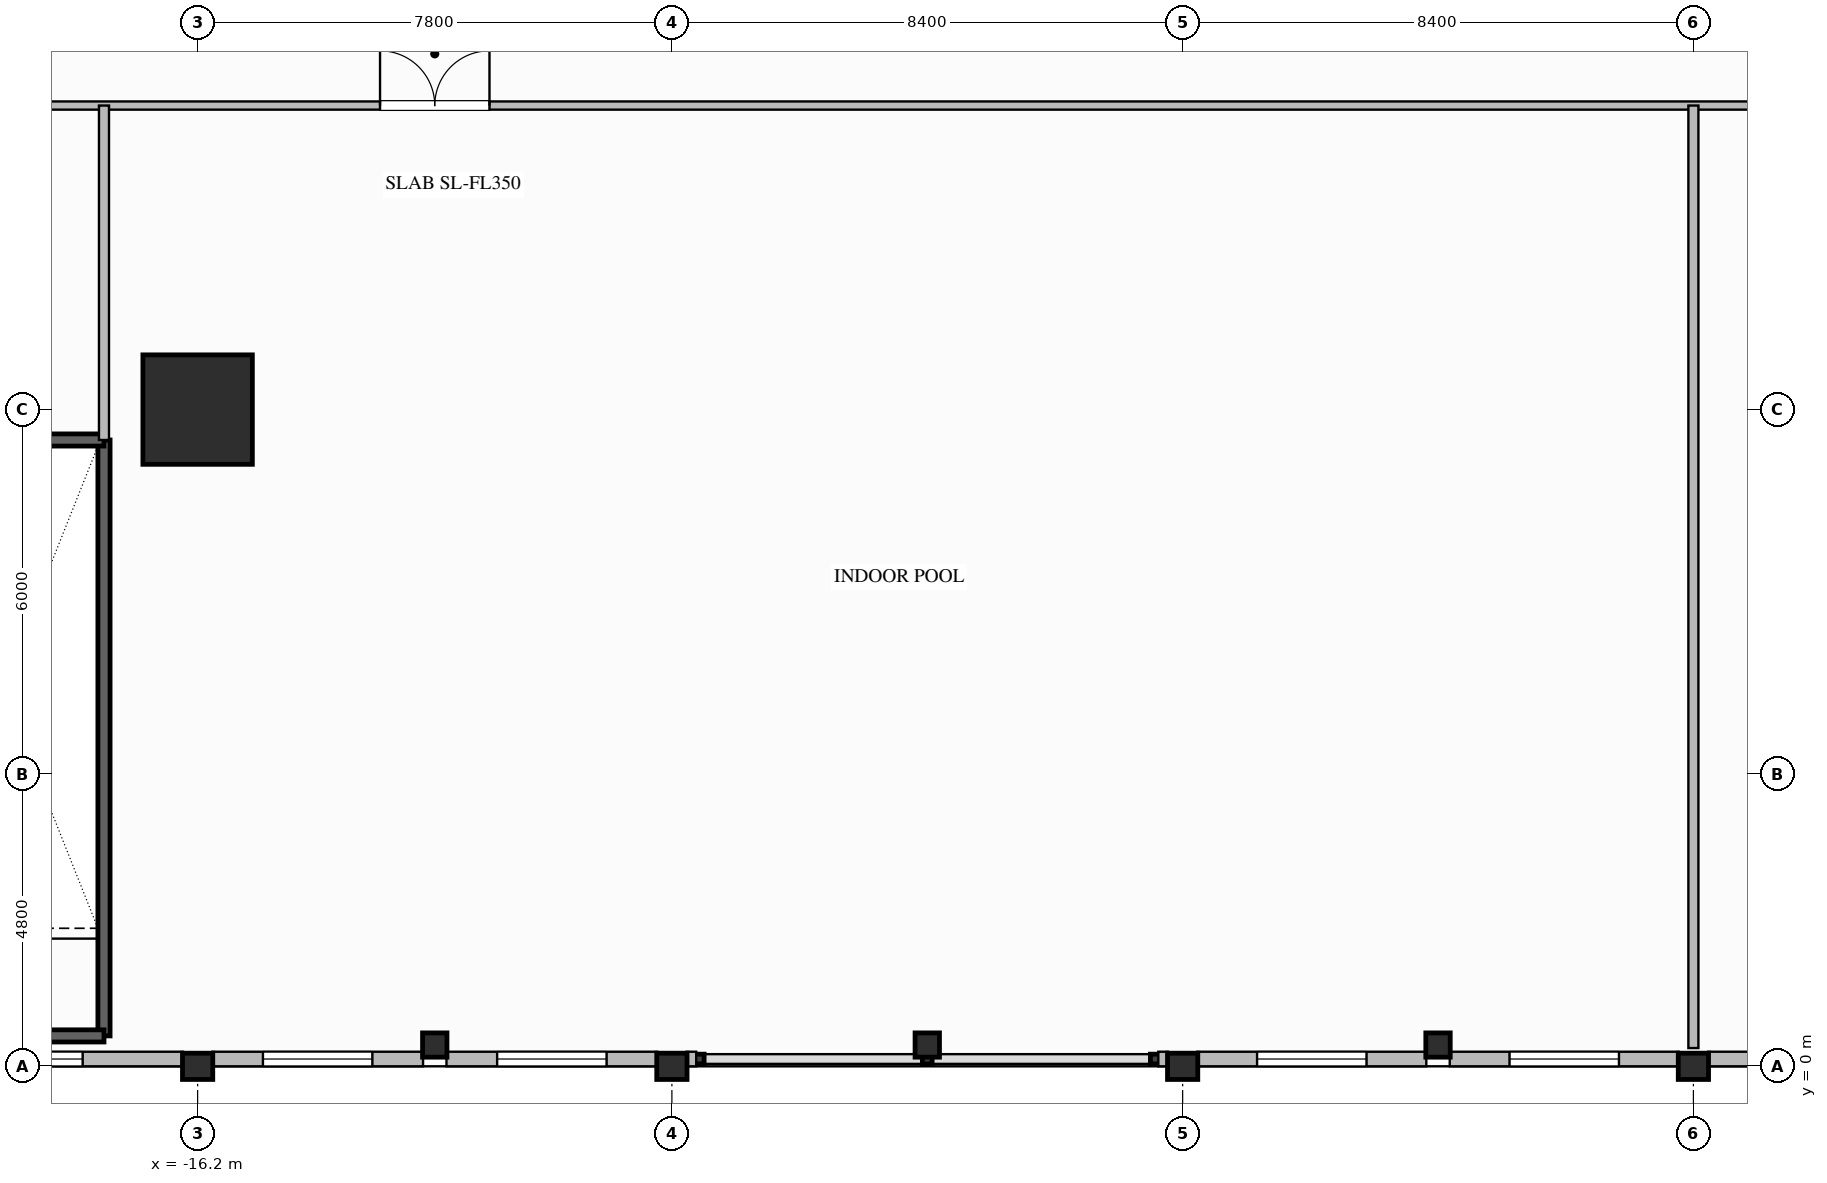
"""IFC4 building model, lengths in metres.
Left out: names, types, materials, properties, quantities, classifications, styles, units other than length and angle.
Written with IfcOpenShell. Run it as: python <this file> out.ifc"""

import sys

from ifc_helpers import new_model, si_unit, direction, frame, frame_2d, origin, origin_2d, place, context, subcontext, project, spatial, rectangle, i_section, extrude, element, fill, save


model = new_model("IFC4")
c1 = context("Model", 3, precision=1e-05, world=origin(), true_north=direction((0.0, 1.0)))
c2 = subcontext(c1, "Body", "Model", "MODEL_VIEW")
j1 = project(units=[si_unit("LENGTHUNIT", "METRE"), si_unit("PLANEANGLEUNIT", "RADIAN")], contexts=[c1])
p1 = place(None, origin())
s1 = spatial("IfcSite", under=j1, at=p1, CompositionType="ELEMENT")
p2 = place(p1, origin())
s2 = spatial("IfcBuilding", under=s1, at=p2, CompositionType="ELEMENT")
p3 = place(p2, frame((0.0, 0.0, 27.6)))
s3 = spatial("IfcBuildingStorey", under=s2, at=p3, CompositionType="ELEMENT", Elevation=27.6)
p4 = place(p3, frame((-16.2, 10.8, 0.0), z_axis=(0.0, 0.0, 1.0), x_axis=(1.0, 0.0, 0.0)))
e1 = element("IfcColumn", 1, at=p4, inside=s3, PredefinedType="COLUMN", context=c2, shape_type="SweptSolid", body=[
    extrude(rectangle(XDim=1.8, YDim=1.8, at=origin_2d()), origin(), (0.0, 0.0, 1.0), 5.6),
])
for number, where, z_axis, x_axis in (
    (2, (-16.2, 0.0, 0.0), (0.0, 0.0, 1.0), (0.0, 1.0, 0.0)),
    (3, (-8.4, 0.0, 0.0), (0.0, 0.0, 1.0), (0.0, 1.0, 0.0)),
    (4, (0.0, 0.0, 0.0), (0.0, 0.0, 1.0), (0.0, 1.0, 0.0)),
    (5, (8.4, 0.0, 0.0), (0.0, 0.0, 1.0), (0.0, 1.0, 0.0)),
):
    element("IfcColumn", number, at=place(p3, frame(where, z_axis=z_axis, x_axis=x_axis)), inside=s3, PredefinedType="COLUMN", context=c2, shape_type="SweptSolid", body=[
        extrude(i_section(OverallWidth=0.432, OverallDepth=0.498, WebThickness=0.056, FlangeThickness=0.089, FilletRadius=0.03, at=origin_2d()), origin(), (0.0, 0.0, 1.0), 5.32),
    ])
for number, where, z_axis, x_axis in (
    (6, (-12.3, 0.35, 0.0), (0.0, 0.0, 1.0), (1.0, 0.0, 0.0)),
    (7, (-4.2, 0.35, 0.0), (0.0, 0.0, 1.0), (1.0, 0.0, 0.0)),
    (8, (4.2, 0.35, 0.0), (0.0, 0.0, 1.0), (1.0, 0.0, 0.0)),
):
    element("IfcColumn", number, at=place(p3, frame(where, z_axis=z_axis, x_axis=x_axis)), inside=s3, PredefinedType="COLUMN", context=c2, shape_type="SweptSolid", body=[
        extrude(i_section(OverallWidth=0.401, OverallDepth=0.399, WebThickness=0.025, FlangeThickness=0.04, FilletRadius=0.025, at=origin_2d()), origin(), (0.0, 0.0, 1.0), 5.32),
    ])
p5 = place(p3, frame((-16.441, 0.12, 0.0), z_axis=(0.0, 0.0, 1.0), x_axis=(-1.0, 0.0, 0.0)))
e9 = element("IfcWall", 9, at=p5, inside=s3, PredefinedType="STANDARD", context=c2, shape_type="SweptSolid", body=[
    extrude(rectangle(XDim=5.518, YDim=0.24, at=frame_2d((2.759, 0.0))), origin(), (0.0, 0.0, 1.0), 4.625),
])
p6 = place(p5, frame((1.65, 0.0, 0.65)))
e10 = element("IfcOpeningElement", 10, at=p6, cuts=e9, PredefinedType="OPENING", context=c2, shape_type="SweptSolid", body=[
    extrude(rectangle(XDim=1.8, YDim=2.2, at=frame_2d((0.9, 1.1))), frame((0.0, 0.13, 0.0), z_axis=(0.0, -1.0, 0.0), x_axis=(1.0, 0.0, 0.0)), (0.0, 0.0, 1.0), 0.26),
])
p7 = place(p3, frame((-12.493, 0.12, 0.0), z_axis=(0.0, 0.0, 1.0), x_axis=(-1.0, 0.0, 0.0)))
e11 = element("IfcWall", 11, at=p7, inside=s3, PredefinedType="STANDARD", context=c2, shape_type="SweptSolid", body=[
    extrude(rectangle(XDim=3.466, YDim=0.24, at=frame_2d((1.733, 0.0))), origin(), (0.0, 0.0, 1.0), 3.52),
])
p8 = place(p7, frame((0.833, 0.0, 0.65)))
e12 = element("IfcOpeningElement", 12, at=p8, cuts=e11, PredefinedType="OPENING", context=c2, shape_type="SweptSolid", body=[
    extrude(rectangle(XDim=1.8, YDim=2.2, at=frame_2d((0.9, 1.1))), frame((0.0, 0.13, 0.0), z_axis=(0.0, -1.0, 0.0), x_axis=(1.0, 0.0, 0.0)), (0.0, 0.0, 1.0), 0.26),
])
p9 = place(p3, frame((-8.641, 0.12, 0.0), z_axis=(0.0, 0.0, 1.0), x_axis=(-1.0, 0.0, 0.0)))
e13 = element("IfcWall", 13, at=p9, inside=s3, PredefinedType="STANDARD", context=c2, shape_type="SweptSolid", body=[
    extrude(rectangle(XDim=3.467, YDim=0.24, at=frame_2d((1.733, 0.0))), origin(), (0.0, 0.0, 1.0), 3.52),
])
p10 = place(p9, frame((0.833, 0.0, 0.65)))
e14 = element("IfcOpeningElement", 14, at=p10, cuts=e13, PredefinedType="OPENING", context=c2, shape_type="SweptSolid", body=[
    extrude(rectangle(XDim=1.8, YDim=2.2, at=frame_2d((0.9, 1.1))), frame((0.0, 0.13, 0.0), z_axis=(0.0, -1.0, 0.0), x_axis=(1.0, 0.0, 0.0)), (0.0, 0.0, 1.0), 0.26),
])
p11 = place(p3, frame((-8.0, 0.12, 0.0), z_axis=(0.0, 0.0, 1.0), x_axis=(-1.0, 0.0, 0.0)))
e15 = element("IfcWall", 15, at=p11, inside=s3, PredefinedType="STANDARD", context=c2, shape_type="SweptSolid", body=[
    extrude(rectangle(XDim=0.159, YDim=0.24, at=frame_2d((0.08, 0.0))), origin(), (0.0, 0.0, 1.0), 5.32),
])
p12 = place(p3, frame((-0.241, 0.12, 0.0), z_axis=(0.0, 0.0, 1.0), x_axis=(-1.0, 0.0, 0.0)))
e16 = element("IfcWall", 16, at=p12, inside=s3, PredefinedType="STANDARD", context=c2, shape_type="SweptSolid", body=[
    extrude(rectangle(XDim=0.159, YDim=0.24, at=frame_2d((0.08, 0.0))), origin(), (0.0, 0.0, 1.0), 5.32),
])
p13 = place(p3, frame((4.007, 0.12, 0.0), z_axis=(0.0, 0.0, 1.0), x_axis=(-1.0, 0.0, 0.0)))
e17 = element("IfcWall", 17, at=p13, inside=s3, PredefinedType="STANDARD", context=c2, shape_type="SweptSolid", body=[
    extrude(rectangle(XDim=3.766, YDim=0.24, at=frame_2d((1.883, 0.0))), origin(), (0.0, 0.0, 1.0), 3.52),
])
p14 = place(p13, frame((0.983, 0.0, 0.65)))
e18 = element("IfcOpeningElement", 18, at=p14, cuts=e17, PredefinedType="OPENING", context=c2, shape_type="SweptSolid", body=[
    extrude(rectangle(XDim=1.8, YDim=2.2, at=frame_2d((0.9, 1.1))), frame((0.0, 0.13, 0.0), z_axis=(0.0, -1.0, 0.0), x_axis=(1.0, 0.0, 0.0)), (0.0, 0.0, 1.0), 0.26),
])
p15 = place(p3, frame((8.159, 0.12, 0.0), z_axis=(0.0, 0.0, 1.0), x_axis=(-1.0, 0.0, 0.0)))
e19 = element("IfcWall", 19, at=p15, inside=s3, PredefinedType="STANDARD", context=c2, shape_type="SweptSolid", body=[
    extrude(rectangle(XDim=3.767, YDim=0.24, at=frame_2d((1.883, 0.0))), origin(), (0.0, 0.0, 1.0), 3.52),
])
p16 = place(p15, frame((0.983, 0.0, 0.65)))
e20 = element("IfcOpeningElement", 20, at=p16, cuts=e19, PredefinedType="OPENING", context=c2, shape_type="SweptSolid", body=[
    extrude(rectangle(XDim=1.8, YDim=2.2, at=frame_2d((0.9, 1.1))), frame((0.0, 0.13, 0.0), z_axis=(0.0, -1.0, 0.0), x_axis=(1.0, 0.0, 0.0)), (0.0, 0.0, 1.0), 0.26),
])
p17 = place(p3, frame((12.107, 0.12, 0.0), z_axis=(0.0, 0.0, 1.0), x_axis=(-1.0, 0.0, 0.0)))
e21 = element("IfcWall", 21, at=p17, inside=s3, PredefinedType="STANDARD", context=c2, shape_type="SweptSolid", body=[
    extrude(rectangle(XDim=3.467, YDim=0.24, at=frame_2d((1.733, 0.0))), origin(), (0.0, 0.0, 1.0), 3.52),
])
p18 = place(p17, frame((0.833, 0.0, 0.65)))
e22 = element("IfcOpeningElement", 22, at=p18, cuts=e21, PredefinedType="OPENING", context=c2, shape_type="SweptSolid", body=[
    extrude(rectangle(XDim=1.8, YDim=2.2, at=frame_2d((0.9, 1.1))), frame((0.0, 0.13, 0.0), z_axis=(0.0, -1.0, 0.0), x_axis=(1.0, 0.0, 0.0)), (0.0, 0.0, 1.0), 0.26),
])
p19 = place(p3, frame((-17.74, 10.3, 0.0), z_axis=(0.0, 0.0, 1.0), x_axis=(0.0, -1.0, 0.0)))
e23 = element("IfcWall", 23, at=p19, inside=s3, PredefinedType="SOLIDWALL", context=c2, shape_type="SweptSolid", body=[
    extrude(rectangle(XDim=9.8, YDim=0.2, at=frame_2d((4.9, 0.0))), origin(), (0.0, 0.0, 1.0), 5.32),
])
for number, where, z_axis, x_axis in (
    (24, (-21.1, 0.5, 0.0), (0.0, 0.0, 1.0), (1.0, 0.0, 0.0)),
    (25, (-17.74, 10.3, 0.0), (0.0, 0.0, 1.0), (-1.0, 0.0, 0.0)),
):
    element("IfcWall", number, at=place(p3, frame(where, z_axis=z_axis, x_axis=x_axis)), inside=s3, PredefinedType="SOLIDWALL", context=c2, shape_type="SweptSolid", body=[
        extrude(rectangle(XDim=3.36, YDim=0.2, at=frame_2d((1.68, 0.0))), origin(), (0.0, 0.0, 1.0), 5.32),
    ])
p20 = place(p3, frame((-21.2, 15.8, 0.0), z_axis=(0.0, 0.0, 1.0), x_axis=(1.0, 0.0, 0.0)))
e26 = element("IfcWall", 26, at=p20, inside=s3, PredefinedType="PARTITIONING", context=c2, shape_type="SweptSolid", body=[
    extrude(rectangle(XDim=46.3, YDim=0.135, at=frame_2d((23.15, 0.0))), origin(), (0.0, 0.0, 1.0), 5.32),
])
p21 = place(p20, frame((8.0, 0.0, 0.0)))
e27 = element("IfcOpeningElement", 27, at=p21, cuts=e26, PredefinedType="OPENING", context=c2, shape_type="SweptSolid", body=[
    extrude(rectangle(XDim=1.8, YDim=2.35, at=frame_2d((0.9, 1.175))), frame((0.0, 0.077, 0.0), z_axis=(0.0, -1.0, 0.0), x_axis=(1.0, 0.0, 0.0)), (0.0, 0.0, 1.0), 0.155),
])
p22 = place(p20, frame((34.2, 0.0, 0.0)))
e28 = element("IfcOpeningElement", 28, at=p22, cuts=e26, PredefinedType="OPENING", context=c2, shape_type="SweptSolid", body=[
    extrude(rectangle(XDim=1.26, YDim=2.2, at=frame_2d((0.63, 1.1))), frame((0.0, 0.077, 0.0), z_axis=(0.0, -1.0, 0.0), x_axis=(1.0, 0.0, 0.0)), (0.0, 0.0, 1.0), 0.155),
])
p23 = place(p3, frame((-17.74, 10.3, 0.0), z_axis=(0.0, 0.0, 1.0), x_axis=(0.0, 1.0, 0.0)))
e29 = element("IfcWall", 29, at=p23, inside=s3, PredefinedType="PARTITIONING", context=c2, shape_type="SweptSolid", body=[
    extrude(rectangle(XDim=5.5, YDim=0.165, at=frame_2d((2.75, 0.0))), origin(), (0.0, 0.0, 1.0), 5.32),
])
p24 = place(p3, frame((8.4, 0.3, 0.0), z_axis=(0.0, 0.0, 1.0), x_axis=(0.0, 1.0, 0.0)))
e30 = element("IfcWall", 30, at=p24, inside=s3, PredefinedType="PARTITIONING", context=c2, shape_type="SweptSolid", body=[
    extrude(rectangle(XDim=15.5, YDim=0.165, at=frame_2d((7.75, 0.0))), origin(), (0.0, 0.0, 1.0), 3.505),
])
p25 = place(p6, origin())
e31 = element("IfcWindow", 31, at=p25, inside=s3, PartitioningType="SINGLE_PANEL", PredefinedType="WINDOW", context=c2, shape_type="SweptSolid", body=[
    extrude(rectangle(XDim=1.8, YDim=2.2, at=frame_2d((0.9, 1.1))), frame((0.0, 0.03, 0.0), z_axis=(0.0, -1.0, 0.0), x_axis=(1.0, 0.0, 0.0)), (0.0, 0.0, 1.0), 0.06),
])
fill(e10, e31)
p26 = place(p8, origin())
e32 = element("IfcWindow", 32, at=p26, inside=s3, PartitioningType="SINGLE_PANEL", PredefinedType="WINDOW", context=c2, shape_type="SweptSolid", body=[
    extrude(rectangle(XDim=1.8, YDim=2.2, at=frame_2d((0.9, 1.1))), frame((0.0, 0.03, 0.0), z_axis=(0.0, -1.0, 0.0), x_axis=(1.0, 0.0, 0.0)), (0.0, 0.0, 1.0), 0.06),
])
fill(e12, e32)
p27 = place(p10, origin())
e33 = element("IfcWindow", 33, at=p27, inside=s3, PartitioningType="SINGLE_PANEL", PredefinedType="WINDOW", context=c2, shape_type="SweptSolid", body=[
    extrude(rectangle(XDim=1.8, YDim=2.2, at=frame_2d((0.9, 1.1))), frame((0.0, 0.03, 0.0), z_axis=(0.0, -1.0, 0.0), x_axis=(1.0, 0.0, 0.0)), (0.0, 0.0, 1.0), 0.06),
])
fill(e14, e33)
p28 = place(p14, origin())
e34 = element("IfcWindow", 34, at=p28, inside=s3, PartitioningType="SINGLE_PANEL", PredefinedType="WINDOW", context=c2, shape_type="SweptSolid", body=[
    extrude(rectangle(XDim=1.8, YDim=2.2, at=frame_2d((0.9, 1.1))), frame((0.0, 0.03, 0.0), z_axis=(0.0, -1.0, 0.0), x_axis=(1.0, 0.0, 0.0)), (0.0, 0.0, 1.0), 0.06),
])
fill(e18, e34)
p29 = place(p16, origin())
e35 = element("IfcWindow", 35, at=p29, inside=s3, PartitioningType="SINGLE_PANEL", PredefinedType="WINDOW", context=c2, shape_type="SweptSolid", body=[
    extrude(rectangle(XDim=1.8, YDim=2.2, at=frame_2d((0.9, 1.1))), frame((0.0, 0.03, 0.0), z_axis=(0.0, -1.0, 0.0), x_axis=(1.0, 0.0, 0.0)), (0.0, 0.0, 1.0), 0.06),
])
fill(e20, e35)
p30 = place(p21, origin())
e36 = element("IfcDoor", 36, at=p30, inside=s3, OperationType="DOUBLE_DOOR_SINGLE_SWING", PredefinedType="DOOR", context=c2, shape_type="SweptSolid", body=[
    extrude(rectangle(XDim=1.8, YDim=2.35, at=frame_2d((0.9, 1.175))), frame((0.0, 0.025, 0.0), z_axis=(0.0, -1.0, 0.0), x_axis=(1.0, 0.0, 0.0)), (0.0, 0.0, 1.0), 0.05),
])
fill(e27, e36)
save(model, sys.argv[1])
